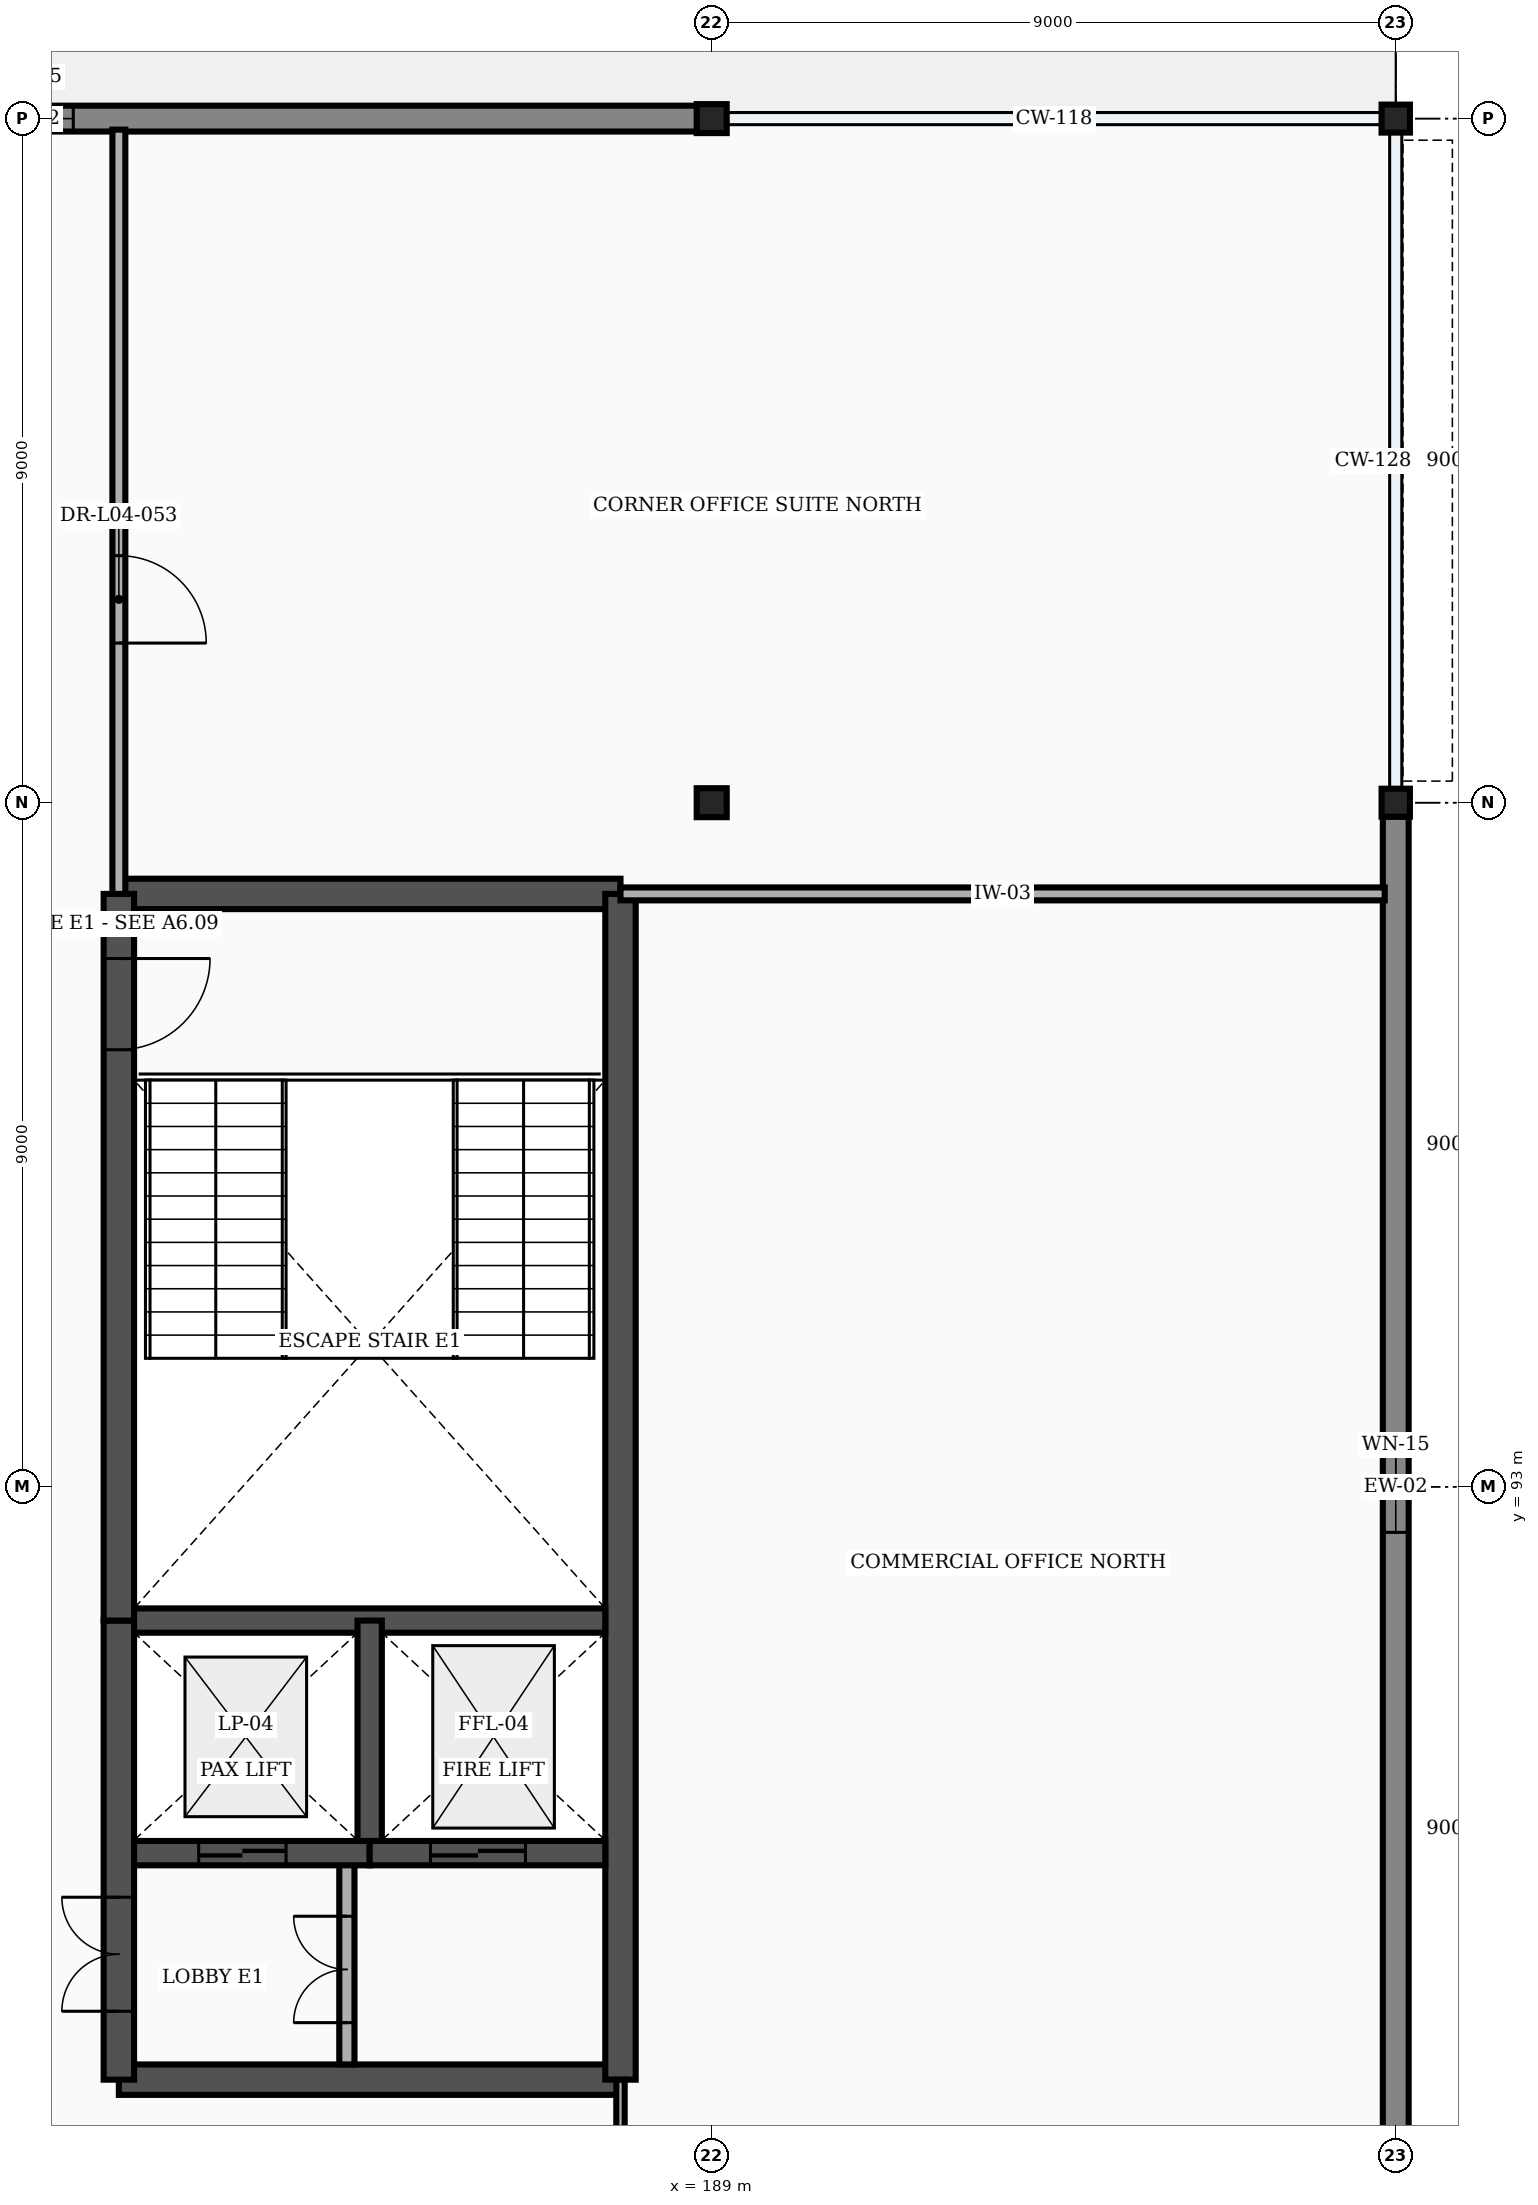
"""IFC4 building model, lengths in metres.
Left out: names, types, materials, properties, quantities, classifications, styles, units other than length and angle.
Written with IfcOpenShell. Run it as: python <this file> out.ifc"""

import sys

from ifc_helpers import new_model, si_unit, direction, frame, frame_2d, origin, origin_2d, place, context, subcontext, project, spatial, rectangle, i_section, extrude, element, fill, save


model = new_model("IFC4")
c1 = context("Model", 3, precision=1e-05, world=origin(), true_north=direction((0.0, 1.0)))
c2 = subcontext(c1, "Body", "Model", "MODEL_VIEW")
j1 = project(units=[si_unit("LENGTHUNIT", "METRE"), si_unit("PLANEANGLEUNIT", "RADIAN")], contexts=[c1])
p1 = place(None, origin())
s1 = spatial("IfcSite", under=j1, at=p1, CompositionType="ELEMENT")
p2 = place(p1, origin())
s2 = spatial("IfcBuilding", under=s1, at=p2, CompositionType="ELEMENT")
p3 = place(p2, frame((0.0, 0.0, 21.6)))
s3 = spatial("IfcBuildingStorey", under=s2, at=p3, CompositionType="ELEMENT", Elevation=21.6)
for number, where, z_axis, x_axis in (
    (1, (189.0, 102.0, 0.0), (0.0, 0.0, 1.0), (1.0, 0.0, 0.0)),
    (2, (189.0, 111.0, 0.0), (0.0, 0.0, 1.0), (1.0, 0.0, 0.0)),
):
    element("IfcColumn", number, at=place(p3, frame(where, z_axis=z_axis, x_axis=x_axis)), inside=s3, PredefinedType="COLUMN", context=c2, shape_type="SweptSolid", body=[
        extrude(i_section(OverallWidth=0.395, OverallDepth=0.381, WebThickness=0.018, FlangeThickness=0.03, at=origin_2d()), origin(), (0.0, 0.0, 1.0), 3.9),
    ])
for number, where, z_axis, x_axis in (
    (3, (198.0, 102.0, 0.0), (0.0, 0.0, 1.0), (1.0, 0.0, 0.0)),
    (4, (198.0, 111.0, 0.0), (0.0, 0.0, 1.0), (1.0, 0.0, 0.0)),
):
    element("IfcColumn", number, at=place(p3, frame(where, z_axis=z_axis, x_axis=x_axis)), inside=s3, PredefinedType="COLUMN", context=c2, shape_type="SweptSolid", body=[
        extrude(i_section(OverallWidth=0.373, OverallDepth=0.368, WebThickness=0.014, FlangeThickness=0.024, FilletRadius=0.015, at=origin_2d()), origin(), (0.0, 0.0, 1.0), 3.9),
    ])
p4 = place(p3, frame((171.01, 111.0, 0.0), z_axis=(0.0, 0.0, 1.0), x_axis=(1.0, 0.0, 0.0)))
e5 = element("IfcWall", 5, at=p4, inside=s3, PredefinedType="STANDARD", context=c2, shape_type="SweptSolid", body=[
    extrude(rectangle(XDim=17.98, YDim=0.34, at=frame_2d((8.99, 0.0))), origin(), (0.0, 0.0, 1.0), 3.245),
])
p5 = place(p4, frame((8.39, 0.0, 0.7)))
e6 = element("IfcOpeningElement", 6, at=p5, cuts=e5, PredefinedType="OPENING", context=c2, shape_type="SweptSolid", body=[
    extrude(rectangle(XDim=1.2, YDim=1.95, at=frame_2d((0.6, 0.975))), frame((0.0, 0.182, 0.0), z_axis=(0.0, -1.0, 0.0), x_axis=(1.0, 0.0, 0.0)), (0.0, 0.0, 1.0), 0.364),
])
p6 = place(p3, frame((198.0, 84.182, 0.0), z_axis=(0.0, 0.0, 1.0), x_axis=(0.0, 1.0, 0.0)))
e7 = element("IfcWall", 7, at=p6, inside=s3, PredefinedType="STANDARD", context=c2, shape_type="SweptSolid", body=[
    extrude(rectangle(XDim=17.636, YDim=0.34, at=frame_2d((8.818, 0.0))), origin(), (0.0, 0.0, 1.0), 2.973),
])
p7 = place(p6, frame((8.218, 0.0, 0.7)))
e8 = element("IfcOpeningElement", 8, at=p7, cuts=e7, PredefinedType="OPENING", context=c2, shape_type="SweptSolid", body=[
    extrude(rectangle(XDim=1.2, YDim=1.95, at=frame_2d((0.6, 0.975))), frame((0.0, 0.182, 0.0), z_axis=(0.0, -1.0, 0.0), x_axis=(1.0, 0.0, 0.0)), (0.0, 0.0, 1.0), 0.364),
])
for number, where, z_axis, x_axis in (
    (9, (181.2, 85.2, 0.0), (0.0, 0.0, 1.0), (1.0, 0.0, 0.0)),
    (10, (181.2, 100.8, 0.0), (0.0, 0.0, 1.0), (1.0, 0.0, 0.0)),
):
    element("IfcWall", number, at=place(p3, frame(where, z_axis=z_axis, x_axis=x_axis)), inside=s3, PredefinedType="SHEAR", context=c2, shape_type="SweptSolid", body=[
        extrude(rectangle(XDim=6.6, YDim=0.4, at=frame_2d((3.3, 0.0))), origin(), (0.0, 0.0, 1.0), 3.585),
    ])
p8 = place(p3, frame((187.8, 85.2, 0.0), z_axis=(0.0, 0.0, 1.0), x_axis=(0.0, 1.0, 0.0)))
e11 = element("IfcWall", 11, at=p8, inside=s3, PredefinedType="SHEAR", context=c2, shape_type="SweptSolid", body=[
    extrude(rectangle(XDim=15.6, YDim=0.4, at=frame_2d((7.8, 0.0))), origin(), (0.0, 0.0, 1.0), 3.585),
])
p9 = place(p3, frame((181.2, 85.2, 0.0), z_axis=(0.0, 0.0, 1.0), x_axis=(0.0, 1.0, 0.0)))
e12 = element("IfcWall", 12, at=p9, inside=s3, PredefinedType="SHEAR", context=c2, shape_type="SweptSolid", body=[
    extrude(rectangle(XDim=6.04, YDim=0.4, at=frame_2d((3.02, 0.0))), origin(), (0.0, 0.0, 1.0), 3.585),
])
p10 = place(p9, frame((0.9, 0.0, 0.0)))
e13 = element("IfcOpeningElement", 13, at=p10, cuts=e12, PredefinedType="OPENING", context=c2, shape_type="SweptSolid", body=[
    extrude(rectangle(XDim=1.5, YDim=2.2, at=frame_2d((0.75, 1.1))), frame((0.0, 0.212, 0.0), z_axis=(0.0, -1.0, 0.0), x_axis=(1.0, 0.0, 0.0)), (0.0, 0.0, 1.0), 0.424),
])
p11 = place(p3, frame((181.2, 91.24, 0.0), z_axis=(0.0, 0.0, 1.0), x_axis=(0.0, 1.0, 0.0)))
e14 = element("IfcWall", 14, at=p11, inside=s3, PredefinedType="SHEAR", context=c2, shape_type="SweptSolid", body=[
    extrude(rectangle(XDim=9.56, YDim=0.4, at=frame_2d((4.78, 0.0))), origin(), (0.0, 0.0, 1.0), 3.585),
])
p12 = place(p11, frame((7.51, 0.0, 0.0)))
e15 = element("IfcOpeningElement", 15, at=p12, cuts=e14, PredefinedType="OPENING", context=c2, shape_type="SweptSolid", body=[
    extrude(rectangle(XDim=1.2, YDim=2.2, at=frame_2d((0.6, 1.1))), frame((0.0, 0.212, 0.0), z_axis=(0.0, -1.0, 0.0), x_axis=(1.0, 0.0, 0.0)), (0.0, 0.0, 1.0), 0.424),
])
p13 = place(p3, frame((181.4, 91.24, 0.0), z_axis=(0.0, 0.0, 1.0), x_axis=(1.0, 0.0, 0.0)))
e16 = element("IfcWall", 16, at=p13, inside=s3, PredefinedType="SHEAR", context=c2, shape_type="SweptSolid", body=[
    extrude(rectangle(XDim=6.2, YDim=0.32, at=frame_2d((3.1, 0.0))), origin(), (0.0, 0.0, 1.0), 3.585),
])
p14 = place(p3, frame((184.5, 88.18, 0.0), z_axis=(0.0, 0.0, 1.0), x_axis=(0.0, 1.0, 0.0)))
e17 = element("IfcWall", 17, at=p14, inside=s3, PredefinedType="SHEAR", context=c2, shape_type="SweptSolid", body=[
    extrude(rectangle(XDim=3.06, YDim=0.32, at=frame_2d((1.53, 0.0))), origin(), (0.0, 0.0, 1.0), 3.585),
])
p15 = place(p3, frame((184.2, 85.4, 0.0), z_axis=(0.0, 0.0, 1.0), x_axis=(0.0, 1.0, 0.0)))
e18 = element("IfcWall", 18, at=p15, inside=s3, PredefinedType="PARTITIONING", context=c2, shape_type="SweptSolid", body=[
    extrude(rectangle(XDim=2.78, YDim=0.2, at=frame_2d((1.39, 0.0))), origin(), (0.0, 0.0, 1.0), 3.585),
])
p16 = place(p15, frame((0.55, 0.0, 0.0)))
e19 = element("IfcOpeningElement", 19, at=p16, cuts=e18, PredefinedType="OPENING", context=c2, shape_type="SweptSolid", body=[
    extrude(rectangle(XDim=1.4, YDim=2.25, at=frame_2d((0.7, 1.125))), frame((0.0, 0.112, 0.0), z_axis=(0.0, -1.0, 0.0), x_axis=(1.0, 0.0, 0.0)), (0.0, 0.0, 1.0), 0.224),
])
p17 = place(p3, frame((181.4, 88.18, 0.0), z_axis=(0.0, 0.0, 1.0), x_axis=(1.0, 0.0, 0.0)))
e20 = element("IfcWall", 20, at=p17, inside=s3, PredefinedType="SHEAR", context=c2, shape_type="SweptSolid", body=[
    extrude(rectangle(XDim=3.1, YDim=0.32, at=frame_2d((1.55, 0.0))), origin(), (0.0, 0.0, 1.0), 3.585),
])
p18 = place(p17, frame((0.85, 0.0, 0.0)))
e21 = element("IfcOpeningElement", 21, at=p18, cuts=e20, PredefinedType="OPENING", context=c2, shape_type="SweptSolid", body=[
    extrude(rectangle(XDim=1.15, YDim=2.2, at=frame_2d((0.575, 1.1))), frame((0.0, 0.172, 0.0), z_axis=(0.0, -1.0, 0.0), x_axis=(1.0, 0.0, 0.0)), (0.0, 0.0, 1.0), 0.344),
])
p19 = place(p3, frame((184.5, 88.18, 0.0), z_axis=(0.0, 0.0, 1.0), x_axis=(1.0, 0.0, 0.0)))
e22 = element("IfcWall", 22, at=p19, inside=s3, PredefinedType="SHEAR", context=c2, shape_type="SweptSolid", body=[
    extrude(rectangle(XDim=3.1, YDim=0.32, at=frame_2d((1.55, 0.0))), origin(), (0.0, 0.0, 1.0), 3.585),
])
p20 = place(p19, frame((0.8, 0.0, 0.0)))
e23 = element("IfcOpeningElement", 23, at=p20, cuts=e22, PredefinedType="OPENING", context=c2, shape_type="SweptSolid", body=[
    extrude(rectangle(XDim=1.25, YDim=2.25, at=frame_2d((0.625, 1.125))), frame((0.0, 0.172, 0.0), z_axis=(0.0, -1.0, 0.0), x_axis=(1.0, 0.0, 0.0)), (0.0, 0.0, 1.0), 0.344),
])
p21 = place(p3, frame((187.8, 83.2, 0.0), z_axis=(0.0, 0.0, 1.0), x_axis=(0.0, 1.0, 0.0)))
e24 = element("IfcWall", 24, at=p21, inside=s3, PredefinedType="PARTITIONING", context=c2, shape_type="SweptSolid", body=[
    extrude(rectangle(XDim=2.0, YDim=0.11, at=frame_2d((1.0, 0.0))), origin(), (0.0, 0.0, 1.0), 3.585),
])
p22 = place(p3, frame((187.8, 100.8, 0.0), z_axis=(0.0, 0.0, 1.0), x_axis=(1.0, 0.0, 0.0)))
e25 = element("IfcWall", 25, at=p22, inside=s3, PredefinedType="PARTITIONING", context=c2, shape_type="SweptSolid", body=[
    extrude(rectangle(XDim=10.055, YDim=0.17, at=frame_2d((5.027, 0.0))), origin(), (0.0, 0.0, 1.0), 3.585),
])
p23 = place(p3, frame((181.2, 100.8, 0.0), z_axis=(0.0, 0.0, 1.0), x_axis=(0.0, 1.0, 0.0)))
e26 = element("IfcWall", 26, at=p23, inside=s3, PredefinedType="PARTITIONING", context=c2, shape_type="SweptSolid", body=[
    extrude(rectangle(XDim=10.055, YDim=0.17, at=frame_2d((5.027, 0.0))), origin(), (0.0, 0.0, 1.0), 3.585),
])
p24 = place(p23, frame((3.3, 0.0, 0.0)))
e27 = element("IfcOpeningElement", 27, at=p24, cuts=e26, PredefinedType="OPENING", context=c2, shape_type="SweptSolid", body=[
    extrude(rectangle(XDim=1.15, YDim=2.15, at=frame_2d((0.575, 1.075))), frame((0.0, 0.097, 0.0), z_axis=(0.0, -1.0, 0.0), x_axis=(1.0, 0.0, 0.0)), (0.0, 0.0, 1.0), 0.194),
])
p25 = place(p5, origin())
e28 = element("IfcWindow", 28, at=p25, inside=s3, PartitioningType="SINGLE_PANEL", PredefinedType="WINDOW", context=c2, shape_type="SweptSolid", body=[
    extrude(rectangle(XDim=1.2, YDim=1.95, at=frame_2d((0.6, 0.975))), frame((0.0, 0.03, 0.0), z_axis=(0.0, -1.0, 0.0), x_axis=(1.0, 0.0, 0.0)), (0.0, 0.0, 1.0), 0.06),
])
fill(e6, e28)
p26 = place(p7, origin())
e29 = element("IfcWindow", 29, at=p26, inside=s3, PartitioningType="SINGLE_PANEL", PredefinedType="WINDOW", context=c2, shape_type="SweptSolid", body=[
    extrude(rectangle(XDim=1.2, YDim=1.95, at=frame_2d((0.6, 0.975))), frame((0.0, 0.03, 0.0), z_axis=(0.0, -1.0, 0.0), x_axis=(1.0, 0.0, 0.0)), (0.0, 0.0, 1.0), 0.06),
])
fill(e8, e29)
p27 = place(p10, origin())
e30 = element("IfcDoor", 30, at=p27, inside=s3, OperationType="DOUBLE_DOOR_SINGLE_SWING", PredefinedType="DOOR", context=c2, shape_type="SweptSolid", body=[
    extrude(rectangle(XDim=1.5, YDim=2.2, at=frame_2d((0.75, 1.1))), frame((0.0, 0.025, 0.0), z_axis=(0.0, -1.0, 0.0), x_axis=(1.0, 0.0, 0.0)), (0.0, 0.0, 1.0), 0.05),
])
fill(e13, e30)
p28 = place(p12, frame((1.2, 0.0, 0.0), z_axis=(0.0, 0.0, 1.0), x_axis=(-1.0, 0.0, 0.0)))
e31 = element("IfcDoor", 31, at=p28, inside=s3, OperationType="SINGLE_SWING_LEFT", PredefinedType="DOOR", context=c2, shape_type="SweptSolid", body=[
    extrude(rectangle(XDim=1.2, YDim=2.2, at=frame_2d((0.6, 1.1))), frame((0.0, 0.025, 0.0), z_axis=(0.0, -1.0, 0.0), x_axis=(1.0, 0.0, 0.0)), (0.0, 0.0, 1.0), 0.05),
])
fill(e15, e31)
p29 = place(p16, origin())
e32 = element("IfcDoor", 32, at=p29, inside=s3, OperationType="DOUBLE_DOOR_SINGLE_SWING", PredefinedType="DOOR", context=c2, shape_type="SweptSolid", body=[
    extrude(rectangle(XDim=1.4, YDim=2.25, at=frame_2d((0.7, 1.125))), frame((0.0, 0.025, 0.0), z_axis=(0.0, -1.0, 0.0), x_axis=(1.0, 0.0, 0.0)), (0.0, 0.0, 1.0), 0.05),
])
fill(e19, e32)
p30 = place(p18, origin())
e33 = element("IfcDoor", 33, at=p30, inside=s3, OperationType="DOUBLE_DOOR_SLIDING", PredefinedType="DOOR", context=c2, shape_type="SweptSolid", body=[
    extrude(rectangle(XDim=1.15, YDim=2.2, at=frame_2d((0.575, 1.1))), frame((0.0, 0.025, 0.0), z_axis=(0.0, -1.0, 0.0), x_axis=(1.0, 0.0, 0.0)), (0.0, 0.0, 1.0), 0.05),
])
fill(e21, e33)
p31 = place(p20, origin())
e34 = element("IfcDoor", 34, at=p31, inside=s3, OperationType="DOUBLE_DOOR_SLIDING", PredefinedType="DOOR", context=c2, shape_type="SweptSolid", body=[
    extrude(rectangle(XDim=1.25, YDim=2.25, at=frame_2d((0.625, 1.125))), frame((0.0, 0.025, 0.0), z_axis=(0.0, -1.0, 0.0), x_axis=(1.0, 0.0, 0.0)), (0.0, 0.0, 1.0), 0.05),
])
fill(e23, e34)
p32 = place(p24, frame((1.15, 0.0, 0.0), z_axis=(0.0, 0.0, 1.0), x_axis=(-1.0, 0.0, 0.0)))
e35 = element("IfcDoor", 35, at=p32, inside=s3, OperationType="SINGLE_SWING_RIGHT", PredefinedType="DOOR", context=c2, shape_type="SweptSolid", body=[
    extrude(rectangle(XDim=1.15, YDim=2.15, at=frame_2d((0.575, 1.075))), frame((0.0, 0.025, 0.0), z_axis=(0.0, -1.0, 0.0), x_axis=(1.0, 0.0, 0.0)), (0.0, 0.0, 1.0), 0.05),
])
fill(e27, e35)
save(model, sys.argv[1])
